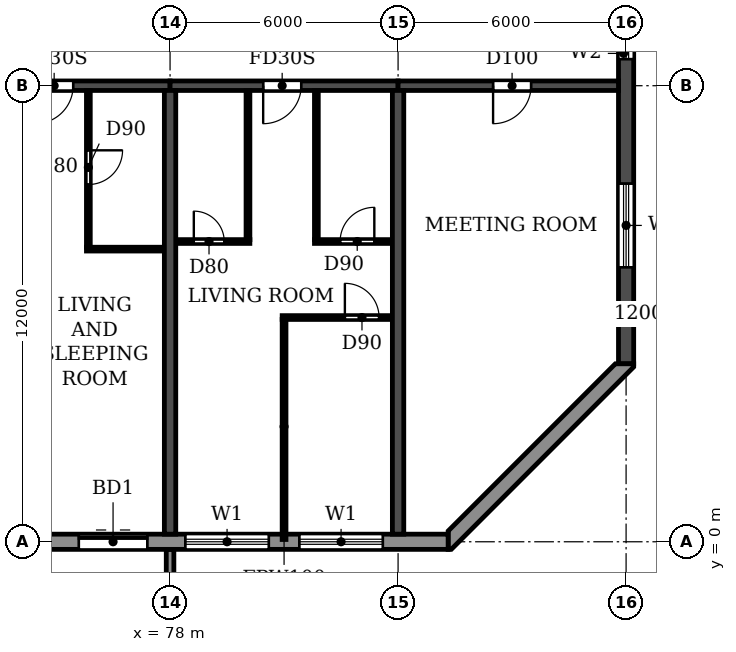
"""IFC4 building model, lengths in metres.
Left out: names, types, materials, properties, quantities, classifications, styles, units other than length and angle.
Written with IfcOpenShell. Run it as: python <this file> out.ifc"""

import sys

from ifc_helpers import new_model, si_unit, direction, frame, frame_2d, origin, place, context, subcontext, project, spatial, polyline, rectangle, outline, extrude, source, transform, mapped, element, fill, save


model = new_model("IFC4")
c1 = context("Model", 3, precision=1e-05, world=origin(), true_north=direction((0.0, 1.0)))
c2 = subcontext(c1, "Body", "Model", "MODEL_VIEW")
j1 = project(units=[si_unit("LENGTHUNIT", "METRE"), si_unit("PLANEANGLEUNIT", "RADIAN")], contexts=[c1])
p1 = place(None, origin())
s1 = spatial("IfcSite", under=j1, at=p1, CompositionType="ELEMENT")
p2 = place(p1, origin())
s2 = spatial("IfcBuilding", under=s1, at=p2, CompositionType="ELEMENT")
p3 = place(p2, frame((0.0, 0.0, 155.4)))
s3 = spatial("IfcBuildingStorey", under=s2, at=p3, CompositionType="ELEMENT", Elevation=155.4)
for number, where, z_axis, x_axis in (
    (1, (78.0, 0.2, 0.0), (0.0, 0.0, 1.0), (0.0, 1.0, 0.0)),
    (2, (84.0, 0.2, 0.0), (0.0, 0.0, 1.0), (0.0, 1.0, 0.0)),
):
    element("IfcWall", number, at=place(p3, frame(where, z_axis=z_axis, x_axis=x_axis)), inside=s3, PredefinedType="SHEAR", context=c2, shape_type="SweptSolid", body=[
        extrude(rectangle(XDim=11.675, YDim=0.3, at=frame_2d((5.837, 0.0))), origin(), (0.0, 0.0, 1.0), 3.0),
    ])
p4 = place(p3, frame((90.0, 4.683, 0.0), z_axis=(0.0, 0.0, 1.0), x_axis=(0.0, 1.0, 0.0)))
e3 = element("IfcWall", 3, at=p4, inside=s3, PredefinedType="SHEAR", context=c2, shape_type="SweptSolid", body=[
    extrude(rectangle(XDim=33.034, YDim=0.4, at=frame_2d((16.517, 0.0))), origin(), (0.0, 0.0, 1.0), 3.0),
])
p5 = place(p4, frame((23.817, 0.0, 0.9)))
e4 = element("IfcOpeningElement", 4, at=p5, cuts=e3, PredefinedType="OPENING", context=c2, shape_type="SweptSolid", body=[
    extrude(rectangle(XDim=1.2, YDim=1.5, at=frame_2d((0.6, 0.75))), frame((0.0, 0.21, 0.0), z_axis=(0.0, -1.0, 0.0), x_axis=(1.0, 0.0, 0.0)), (0.0, 0.0, 1.0), 0.42),
])
p6 = place(p4, frame((8.017, 0.0, 0.9)))
e5 = element("IfcOpeningElement", 5, at=p6, cuts=e3, PredefinedType="OPENING", context=c2, shape_type="SweptSolid", body=[
    extrude(rectangle(XDim=1.2, YDim=1.5, at=frame_2d((0.6, 0.75))), frame((0.0, 0.21, 0.0), z_axis=(0.0, -1.0, 0.0), x_axis=(1.0, 0.0, 0.0)), (0.0, 0.0, 1.0), 0.42),
])
p7 = place(p4, frame((28.293, 0.0, 0.6)))
e6 = element("IfcOpeningElement", 6, at=p7, cuts=e3, PredefinedType="OPENING", context=c2, shape_type="SweptSolid", body=[
    extrude(rectangle(XDim=2.2, YDim=1.8, at=frame_2d((1.1, 0.9))), frame((0.0, 0.21, 0.0), z_axis=(0.0, -1.0, 0.0), x_axis=(1.0, 0.0, 0.0)), (0.0, 0.0, 1.0), 0.42),
])
p8 = place(p4, frame((2.541, 0.0, 0.6)))
e7 = element("IfcOpeningElement", 7, at=p8, cuts=e3, PredefinedType="OPENING", context=c2, shape_type="SweptSolid", body=[
    extrude(rectangle(XDim=2.2, YDim=1.8, at=frame_2d((1.1, 0.9))), frame((0.0, 0.21, 0.0), z_axis=(0.0, -1.0, 0.0), x_axis=(1.0, 0.0, 0.0)), (0.0, 0.0, 1.0), 0.42),
])
p9 = place(p4, frame((19.417, 0.0, 0.6)))
e8 = element("IfcOpeningElement", 8, at=p9, cuts=e3, PredefinedType="OPENING", context=c2, shape_type="SweptSolid", body=[
    extrude(rectangle(XDim=2.2, YDim=1.8, at=frame_2d((1.1, 0.9))), frame((0.0, 0.21, 0.0), z_axis=(0.0, -1.0, 0.0), x_axis=(1.0, 0.0, 0.0)), (0.0, 0.0, 1.0), 0.42),
])
p10 = place(p3, frame((72.0, 12.0, 0.0), z_axis=(0.0, 0.0, 1.0), x_axis=(1.0, 0.0, 0.0)))
e9 = element("IfcWall", 9, at=p10, inside=s3, PredefinedType="SHEAR", context=c2, shape_type="SweptSolid", body=[
    extrude(rectangle(XDim=6.0, YDim=0.25, at=frame_2d((3.0, 0.0))), origin(), (0.0, 0.0, 1.0), 2.4),
])
p11 = place(p10, frame((2.45, 0.0, 0.0)))
e10 = element("IfcOpeningElement", 10, at=p11, cuts=e9, PredefinedType="OPENING", context=c2, shape_type="SweptSolid", body=[
    extrude(rectangle(XDim=1.0, YDim=2.1, at=frame_2d((0.5, 1.05))), frame((0.0, 0.135, 0.0), z_axis=(0.0, -1.0, 0.0), x_axis=(1.0, 0.0, 0.0)), (0.0, 0.0, 1.0), 0.27),
])
p12 = place(p3, frame((78.0, 12.0, 0.0), z_axis=(0.0, 0.0, 1.0), x_axis=(1.0, 0.0, 0.0)))
e11 = element("IfcWall", 11, at=p12, inside=s3, PredefinedType="SHEAR", context=c2, shape_type="SweptSolid", body=[
    extrude(rectangle(XDim=6.0, YDim=0.25, at=frame_2d((3.0, 0.0))), origin(), (0.0, 0.0, 1.0), 2.4),
])
p13 = place(p12, frame((2.45, 0.0, 0.0)))
e12 = element("IfcOpeningElement", 12, at=p13, cuts=e11, PredefinedType="OPENING", context=c2, shape_type="SweptSolid", body=[
    extrude(rectangle(XDim=1.0, YDim=2.1, at=frame_2d((0.5, 1.05))), frame((0.0, 0.135, 0.0), z_axis=(0.0, -1.0, 0.0), x_axis=(1.0, 0.0, 0.0)), (0.0, 0.0, 1.0), 0.27),
])
p14 = place(p3, frame((84.0, 12.0, 0.0), z_axis=(0.0, 0.0, 1.0), x_axis=(1.0, 0.0, 0.0)))
e13 = element("IfcWall", 13, at=p14, inside=s3, PredefinedType="SHEAR", context=c2, shape_type="SweptSolid", body=[
    extrude(rectangle(XDim=5.8, YDim=0.25, at=frame_2d((2.9, 0.0))), origin(), (0.0, 0.0, 1.0), 2.4),
])
p15 = place(p14, frame((2.5, 0.0, 0.0)))
e14 = element("IfcOpeningElement", 14, at=p15, cuts=e13, PredefinedType="OPENING", context=c2, shape_type="SweptSolid", body=[
    extrude(rectangle(XDim=1.0, YDim=2.1, at=frame_2d((0.5, 1.05))), frame((0.0, 0.135, 0.0), z_axis=(0.0, -1.0, 0.0), x_axis=(1.0, 0.0, 0.0)), (0.0, 0.0, 1.0), 0.27),
])
p16 = place(p3, frame((16.683, 0.0, 0.0), z_axis=(0.0, 0.0, 1.0), x_axis=(1.0, 0.0, 0.0)))
e15 = element("IfcWall", 15, at=p16, inside=s3, PredefinedType="STANDARD", context=c2, shape_type="SweptSolid", body=[
    extrude(rectangle(XDim=68.634, YDim=0.4, at=frame_2d((34.317, 0.0))), origin(), (0.0, 0.0, 1.0), 3.0),
])
p17 = place(p16, frame((1.717, 0.0, 0.9)))
e16 = element("IfcOpeningElement", 16, at=p17, cuts=e15, PredefinedType="OPENING", context=c2, shape_type="SweptSolid", body=[
    extrude(rectangle(XDim=2.2, YDim=1.5, at=frame_2d((1.1, 0.75))), frame((0.0, 0.21, 0.0), z_axis=(0.0, -1.0, 0.0), x_axis=(1.0, 0.0, 0.0)), (0.0, 0.0, 1.0), 0.42),
])
p18 = place(p16, frame((4.717, 0.0, 0.9)))
e17 = element("IfcOpeningElement", 17, at=p18, cuts=e15, PredefinedType="OPENING", context=c2, shape_type="SweptSolid", body=[
    extrude(rectangle(XDim=2.2, YDim=1.5, at=frame_2d((1.1, 0.75))), frame((0.0, 0.21, 0.0), z_axis=(0.0, -1.0, 0.0), x_axis=(1.0, 0.0, 0.0)), (0.0, 0.0, 1.0), 0.42),
])
p19 = place(p16, frame((7.917, 0.0, 0.0)))
e18 = element("IfcOpeningElement", 18, at=p19, cuts=e15, PredefinedType="OPENING", context=c2, shape_type="SweptSolid", body=[
    extrude(rectangle(XDim=1.8, YDim=2.4, at=frame_2d((0.9, 1.2))), frame((0.0, 0.21, 0.0), z_axis=(0.0, -1.0, 0.0), x_axis=(1.0, 0.0, 0.0)), (0.0, 0.0, 1.0), 0.42),
])
p20 = place(p16, frame((10.717, 0.0, 0.9)))
e19 = element("IfcOpeningElement", 19, at=p20, cuts=e15, PredefinedType="OPENING", context=c2, shape_type="SweptSolid", body=[
    extrude(rectangle(XDim=2.2, YDim=1.5, at=frame_2d((1.1, 0.75))), frame((0.0, 0.21, 0.0), z_axis=(0.0, -1.0, 0.0), x_axis=(1.0, 0.0, 0.0)), (0.0, 0.0, 1.0), 0.42),
])
p21 = place(p16, frame((13.717, 0.0, 0.9)))
e20 = element("IfcOpeningElement", 20, at=p21, cuts=e15, PredefinedType="OPENING", context=c2, shape_type="SweptSolid", body=[
    extrude(rectangle(XDim=2.2, YDim=1.5, at=frame_2d((1.1, 0.75))), frame((0.0, 0.21, 0.0), z_axis=(0.0, -1.0, 0.0), x_axis=(1.0, 0.0, 0.0)), (0.0, 0.0, 1.0), 0.42),
])
p22 = place(p16, frame((16.717, 0.0, 0.9)))
e21 = element("IfcOpeningElement", 21, at=p22, cuts=e15, PredefinedType="OPENING", context=c2, shape_type="SweptSolid", body=[
    extrude(rectangle(XDim=2.2, YDim=1.5, at=frame_2d((1.1, 0.75))), frame((0.0, 0.21, 0.0), z_axis=(0.0, -1.0, 0.0), x_axis=(1.0, 0.0, 0.0)), (0.0, 0.0, 1.0), 0.42),
])
p23 = place(p16, frame((19.717, 0.0, 0.9)))
e22 = element("IfcOpeningElement", 22, at=p23, cuts=e15, PredefinedType="OPENING", context=c2, shape_type="SweptSolid", body=[
    extrude(rectangle(XDim=2.2, YDim=1.5, at=frame_2d((1.1, 0.75))), frame((0.0, 0.21, 0.0), z_axis=(0.0, -1.0, 0.0), x_axis=(1.0, 0.0, 0.0)), (0.0, 0.0, 1.0), 0.42),
])
p24 = place(p16, frame((22.917, 0.0, 0.0)))
e23 = element("IfcOpeningElement", 23, at=p24, cuts=e15, PredefinedType="OPENING", context=c2, shape_type="SweptSolid", body=[
    extrude(rectangle(XDim=1.8, YDim=2.4, at=frame_2d((0.9, 1.2))), frame((0.0, 0.21, 0.0), z_axis=(0.0, -1.0, 0.0), x_axis=(1.0, 0.0, 0.0)), (0.0, 0.0, 1.0), 0.42),
])
p25 = place(p16, frame((25.717, 0.0, 0.9)))
e24 = element("IfcOpeningElement", 24, at=p25, cuts=e15, PredefinedType="OPENING", context=c2, shape_type="SweptSolid", body=[
    extrude(rectangle(XDim=2.2, YDim=1.5, at=frame_2d((1.1, 0.75))), frame((0.0, 0.21, 0.0), z_axis=(0.0, -1.0, 0.0), x_axis=(1.0, 0.0, 0.0)), (0.0, 0.0, 1.0), 0.42),
])
p26 = place(p16, frame((28.717, 0.0, 0.9)))
e25 = element("IfcOpeningElement", 25, at=p26, cuts=e15, PredefinedType="OPENING", context=c2, shape_type="SweptSolid", body=[
    extrude(rectangle(XDim=2.2, YDim=1.5, at=frame_2d((1.1, 0.75))), frame((0.0, 0.21, 0.0), z_axis=(0.0, -1.0, 0.0), x_axis=(1.0, 0.0, 0.0)), (0.0, 0.0, 1.0), 0.42),
])
p27 = place(p16, frame((31.917, 0.0, 0.0)))
e26 = element("IfcOpeningElement", 26, at=p27, cuts=e15, PredefinedType="OPENING", context=c2, shape_type="SweptSolid", body=[
    extrude(rectangle(XDim=1.8, YDim=2.4, at=frame_2d((0.9, 1.2))), frame((0.0, 0.21, 0.0), z_axis=(0.0, -1.0, 0.0), x_axis=(1.0, 0.0, 0.0)), (0.0, 0.0, 1.0), 0.42),
])
p28 = place(p16, frame((34.717, 0.0, 0.9)))
e27 = element("IfcOpeningElement", 27, at=p28, cuts=e15, PredefinedType="OPENING", context=c2, shape_type="SweptSolid", body=[
    extrude(rectangle(XDim=2.2, YDim=1.5, at=frame_2d((1.1, 0.75))), frame((0.0, 0.21, 0.0), z_axis=(0.0, -1.0, 0.0), x_axis=(1.0, 0.0, 0.0)), (0.0, 0.0, 1.0), 0.42),
])
p29 = place(p16, frame((37.717, 0.0, 0.9)))
e28 = element("IfcOpeningElement", 28, at=p29, cuts=e15, PredefinedType="OPENING", context=c2, shape_type="SweptSolid", body=[
    extrude(rectangle(XDim=2.2, YDim=1.5, at=frame_2d((1.1, 0.75))), frame((0.0, 0.21, 0.0), z_axis=(0.0, -1.0, 0.0), x_axis=(1.0, 0.0, 0.0)), (0.0, 0.0, 1.0), 0.42),
])
p30 = place(p16, frame((40.717, 0.0, 0.9)))
e29 = element("IfcOpeningElement", 29, at=p30, cuts=e15, PredefinedType="OPENING", context=c2, shape_type="SweptSolid", body=[
    extrude(rectangle(XDim=2.2, YDim=1.5, at=frame_2d((1.1, 0.75))), frame((0.0, 0.21, 0.0), z_axis=(0.0, -1.0, 0.0), x_axis=(1.0, 0.0, 0.0)), (0.0, 0.0, 1.0), 0.42),
])
p31 = place(p16, frame((43.717, 0.0, 0.9)))
e30 = element("IfcOpeningElement", 30, at=p31, cuts=e15, PredefinedType="OPENING", context=c2, shape_type="SweptSolid", body=[
    extrude(rectangle(XDim=2.2, YDim=1.5, at=frame_2d((1.1, 0.75))), frame((0.0, 0.21, 0.0), z_axis=(0.0, -1.0, 0.0), x_axis=(1.0, 0.0, 0.0)), (0.0, 0.0, 1.0), 0.42),
])
p32 = place(p16, frame((46.917, 0.0, 0.0)))
e31 = element("IfcOpeningElement", 31, at=p32, cuts=e15, PredefinedType="OPENING", context=c2, shape_type="SweptSolid", body=[
    extrude(rectangle(XDim=1.8, YDim=2.4, at=frame_2d((0.9, 1.2))), frame((0.0, 0.21, 0.0), z_axis=(0.0, -1.0, 0.0), x_axis=(1.0, 0.0, 0.0)), (0.0, 0.0, 1.0), 0.42),
])
p33 = place(p16, frame((49.717, 0.0, 0.9)))
e32 = element("IfcOpeningElement", 32, at=p33, cuts=e15, PredefinedType="OPENING", context=c2, shape_type="SweptSolid", body=[
    extrude(rectangle(XDim=2.2, YDim=1.5, at=frame_2d((1.1, 0.75))), frame((0.0, 0.21, 0.0), z_axis=(0.0, -1.0, 0.0), x_axis=(1.0, 0.0, 0.0)), (0.0, 0.0, 1.0), 0.42),
])
p34 = place(p16, frame((52.717, 0.0, 0.9)))
e33 = element("IfcOpeningElement", 33, at=p34, cuts=e15, PredefinedType="OPENING", context=c2, shape_type="SweptSolid", body=[
    extrude(rectangle(XDim=2.2, YDim=1.5, at=frame_2d((1.1, 0.75))), frame((0.0, 0.21, 0.0), z_axis=(0.0, -1.0, 0.0), x_axis=(1.0, 0.0, 0.0)), (0.0, 0.0, 1.0), 0.42),
])
p35 = place(p16, frame((55.717, 0.0, 0.9)))
e34 = element("IfcOpeningElement", 34, at=p35, cuts=e15, PredefinedType="OPENING", context=c2, shape_type="SweptSolid", body=[
    extrude(rectangle(XDim=2.2, YDim=1.5, at=frame_2d((1.1, 0.75))), frame((0.0, 0.21, 0.0), z_axis=(0.0, -1.0, 0.0), x_axis=(1.0, 0.0, 0.0)), (0.0, 0.0, 1.0), 0.42),
])
p36 = place(p16, frame((58.917, 0.0, 0.0)))
e35 = element("IfcOpeningElement", 35, at=p36, cuts=e15, PredefinedType="OPENING", context=c2, shape_type="SweptSolid", body=[
    extrude(rectangle(XDim=1.8, YDim=2.4, at=frame_2d((0.9, 1.2))), frame((0.0, 0.21, 0.0), z_axis=(0.0, -1.0, 0.0), x_axis=(1.0, 0.0, 0.0)), (0.0, 0.0, 1.0), 0.42),
])
p37 = place(p16, frame((61.717, 0.0, 0.9)))
e36 = element("IfcOpeningElement", 36, at=p37, cuts=e15, PredefinedType="OPENING", context=c2, shape_type="SweptSolid", body=[
    extrude(rectangle(XDim=2.2, YDim=1.5, at=frame_2d((1.1, 0.75))), frame((0.0, 0.21, 0.0), z_axis=(0.0, -1.0, 0.0), x_axis=(1.0, 0.0, 0.0)), (0.0, 0.0, 1.0), 0.42),
])
p38 = place(p16, frame((64.717, 0.0, 0.9)))
e37 = element("IfcOpeningElement", 37, at=p38, cuts=e15, PredefinedType="OPENING", context=c2, shape_type="SweptSolid", body=[
    extrude(rectangle(XDim=2.2, YDim=1.5, at=frame_2d((1.1, 0.75))), frame((0.0, 0.21, 0.0), z_axis=(0.0, -1.0, 0.0), x_axis=(1.0, 0.0, 0.0)), (0.0, 0.0, 1.0), 0.42),
])
p39 = place(p3, origin())
e38 = element("IfcWall", 38, at=p39, inside=s3, PredefinedType="STANDARD", context=c2, shape_type="SweptSolid", body=[
    extrude(outline(polyline([(85.317, -0.2), (85.4, -0.2), (90.2, 4.6), (90.2, 4.683), (89.717, 4.683), (85.317, 0.283), (85.317, -0.2)])), origin(), (0.0, 0.0, 1.0), 3.0),
])
m1 = source(origin(), c2, "Body", "SweptSolid", [
    extrude(outline(polyline([(0.0, 0.0), (0.2, 0.0), (0.2, 1.65), (0.0, 1.65), (0.0, 0.0)])), origin(), (0.0, 0.0, 1.0), 3.1),
])
p40 = place(p3, frame((77.9, -1.85, 0.0)))
e39 = element("IfcWall", 39, at=p40, inside=s3, PredefinedType="STANDARD", context=c2, shape_type="MappedRepresentation", body=[
    mapped(m1, transform((0.0, 0.0, 0.0))),
])
p41 = place(p3, frame((80.95, 5.9, 0.0), z_axis=(0.0, 0.0, 1.0), x_axis=(1.0, 0.0, 0.0)))
e40 = element("IfcWall", 40, at=p41, inside=s3, PredefinedType="PARTITIONING", context=c2, shape_type="SweptSolid", body=[
    extrude(rectangle(XDim=2.89, YDim=0.1, at=frame_2d((1.445, 0.0))), origin(), (0.0, 0.0, 1.0), 3.0),
])
p42 = place(p41, frame((1.65, 0.0, 0.0)))
e41 = element("IfcOpeningElement", 41, at=p42, cuts=e40, PredefinedType="OPENING", context=c2, shape_type="SweptSolid", body=[
    extrude(rectangle(XDim=0.9, YDim=2.1, at=frame_2d((0.45, 1.05))), frame((0.0, 0.06, 0.0), z_axis=(0.0, -1.0, 0.0), x_axis=(1.0, 0.0, 0.0)), (0.0, 0.0, 1.0), 0.12),
])
p43 = place(p3, frame((75.8, 7.7, 0.0), z_axis=(0.0, 0.0, 1.0), x_axis=(1.0, 0.0, 0.0)))
e42 = element("IfcWall", 42, at=p43, inside=s3, PredefinedType="PARTITIONING", context=c2, shape_type="SweptSolid", body=[
    extrude(rectangle(XDim=2.04, YDim=0.1, at=frame_2d((1.02, 0.0))), origin(), (0.0, 0.0, 1.0), 3.0),
])
p44 = place(p3, frame((78.16, 7.9, 0.0), z_axis=(0.0, 0.0, 1.0), x_axis=(1.0, 0.0, 0.0)))
e43 = element("IfcWall", 43, at=p44, inside=s3, PredefinedType="PARTITIONING", context=c2, shape_type="SweptSolid", body=[
    extrude(rectangle(XDim=1.94, YDim=0.1, at=frame_2d((0.97, 0.0))), origin(), (0.0, 0.0, 1.0), 3.0),
])
p45 = place(p44, frame((0.465, 0.0, 0.0)))
e44 = element("IfcOpeningElement", 44, at=p45, cuts=e43, PredefinedType="OPENING", context=c2, shape_type="SweptSolid", body=[
    extrude(rectangle(XDim=0.8, YDim=2.1, at=frame_2d((0.4, 1.05))), frame((0.0, 0.06, 0.0), z_axis=(0.0, -1.0, 0.0), x_axis=(1.0, 0.0, 0.0)), (0.0, 0.0, 1.0), 0.12),
])
p46 = place(p3, frame((81.8, 7.9, 0.0), z_axis=(0.0, 0.0, 1.0), x_axis=(1.0, 0.0, 0.0)))
e45 = element("IfcWall", 45, at=p46, inside=s3, PredefinedType="PARTITIONING", context=c2, shape_type="SweptSolid", body=[
    extrude(rectangle(XDim=2.04, YDim=0.1, at=frame_2d((1.02, 0.0))), origin(), (0.0, 0.0, 1.0), 3.0),
])
p47 = place(p46, frame((0.675, 0.0, 0.0)))
e46 = element("IfcOpeningElement", 46, at=p47, cuts=e45, PredefinedType="OPENING", context=c2, shape_type="SweptSolid", body=[
    extrude(rectangle(XDim=0.9, YDim=2.1, at=frame_2d((0.45, 1.05))), frame((0.0, 0.06, 0.0), z_axis=(0.0, -1.0, 0.0), x_axis=(1.0, 0.0, 0.0)), (0.0, 0.0, 1.0), 0.12),
])
p48 = place(p3, frame((75.85, 7.75, 0.0), z_axis=(0.0, 0.0, 1.0), x_axis=(0.0, 1.0, 0.0)))
e47 = element("IfcWall", 47, at=p48, inside=s3, PredefinedType="PARTITIONING", context=c2, shape_type="SweptSolid", body=[
    extrude(rectangle(XDim=4.115, YDim=0.1, at=frame_2d((2.058, 0.0))), origin(), (0.0, 0.0, 1.0), 3.0),
])
p49 = place(p48, frame((1.65, 0.0, 0.0)))
e48 = element("IfcOpeningElement", 48, at=p49, cuts=e47, PredefinedType="OPENING", context=c2, shape_type="SweptSolid", body=[
    extrude(rectangle(XDim=0.9, YDim=2.1, at=frame_2d((0.45, 1.05))), frame((0.0, 0.06, 0.0), z_axis=(0.0, -1.0, 0.0), x_axis=(1.0, 0.0, 0.0)), (0.0, 0.0, 1.0), 0.12),
])
p50 = place(p3, frame((80.05, 7.95, 0.0), z_axis=(0.0, 0.0, 1.0), x_axis=(0.0, 1.0, 0.0)))
e49 = element("IfcWall", 49, at=p50, inside=s3, PredefinedType="PARTITIONING", context=c2, shape_type="SweptSolid", body=[
    extrude(rectangle(XDim=3.915, YDim=0.1, at=frame_2d((1.958, 0.0))), origin(), (0.0, 0.0, 1.0), 3.0),
])
p51 = place(p3, frame((81.0, 0.06, 0.0), z_axis=(0.0, 0.0, 1.0), x_axis=(0.0, 1.0, 0.0)))
e50 = element("IfcWall", 50, at=p51, inside=s3, PredefinedType="PARTITIONING", context=c2, shape_type="SweptSolid", body=[
    extrude(rectangle(XDim=5.79, YDim=0.1, at=frame_2d((2.895, 0.0))), origin(), (0.0, 0.0, 1.0), 3.0),
])
p52 = place(p3, frame((81.85, 7.95, 0.0), z_axis=(0.0, 0.0, 1.0), x_axis=(0.0, 1.0, 0.0)))
e51 = element("IfcWall", 51, at=p52, inside=s3, PredefinedType="PARTITIONING", context=c2, shape_type="SweptSolid", body=[
    extrude(rectangle(XDim=3.915, YDim=0.1, at=frame_2d((1.958, 0.0))), origin(), (0.0, 0.0, 1.0), 3.0),
])
p53 = place(p36, origin())
e52 = element("IfcDoor", 52, at=p53, inside=s3, OperationType="DOUBLE_DOOR_SLIDING", PredefinedType="DOOR", context=c2, shape_type="SweptSolid", body=[
    extrude(rectangle(XDim=1.8, YDim=2.4, at=frame_2d((0.9, 1.2))), frame((0.0, 0.025, 0.0), z_axis=(0.0, -1.0, 0.0), x_axis=(1.0, 0.0, 0.0)), (0.0, 0.0, 1.0), 0.05),
])
fill(e35, e52)
p54 = place(p37, origin())
e53 = element("IfcWindow", 53, at=p54, inside=s3, PartitioningType="DOUBLE_PANEL_HORIZONTAL", PredefinedType="WINDOW", context=c2, shape_type="SweptSolid", body=[
    extrude(rectangle(XDim=2.2, YDim=1.5, at=frame_2d((1.1, 0.75))), frame((0.0, 0.03, 0.0), z_axis=(0.0, -1.0, 0.0), x_axis=(1.0, 0.0, 0.0)), (0.0, 0.0, 1.0), 0.06),
])
fill(e36, e53)
p55 = place(p38, origin())
e54 = element("IfcWindow", 54, at=p55, inside=s3, PartitioningType="DOUBLE_PANEL_HORIZONTAL", PredefinedType="WINDOW", context=c2, shape_type="SweptSolid", body=[
    extrude(rectangle(XDim=2.2, YDim=1.5, at=frame_2d((1.1, 0.75))), frame((0.0, 0.03, 0.0), z_axis=(0.0, -1.0, 0.0), x_axis=(1.0, 0.0, 0.0)), (0.0, 0.0, 1.0), 0.06),
])
fill(e37, e54)
p56 = place(p6, origin())
e55 = element("IfcWindow", 55, at=p56, inside=s3, PartitioningType="SINGLE_PANEL", PredefinedType="WINDOW", context=c2, shape_type="SweptSolid", body=[
    extrude(rectangle(XDim=1.2, YDim=1.5, at=frame_2d((0.6, 0.75))), frame((0.0, 0.03, 0.0), z_axis=(0.0, -1.0, 0.0), x_axis=(1.0, 0.0, 0.0)), (0.0, 0.0, 1.0), 0.06),
])
fill(e5, e55)
p57 = place(p8, origin())
e56 = element("IfcWindow", 56, at=p57, inside=s3, PartitioningType="DOUBLE_PANEL_HORIZONTAL", PredefinedType="WINDOW", context=c2, shape_type="SweptSolid", body=[
    extrude(rectangle(XDim=2.2, YDim=1.8, at=frame_2d((1.1, 0.9))), frame((0.0, 0.03, 0.0), z_axis=(0.0, -1.0, 0.0), x_axis=(1.0, 0.0, 0.0)), (0.0, 0.0, 1.0), 0.06),
])
fill(e7, e56)
p58 = place(p11, frame((1.0, 0.0, 0.0), z_axis=(0.0, 0.0, 1.0), x_axis=(-1.0, 0.0, 0.0)))
e57 = element("IfcDoor", 57, at=p58, inside=s3, OperationType="SINGLE_SWING_RIGHT", PredefinedType="DOOR", context=c2, shape_type="SweptSolid", body=[
    extrude(rectangle(XDim=1.0, YDim=2.1, at=frame_2d((0.5, 1.05))), frame((0.0, 0.025, 0.0), z_axis=(0.0, -1.0, 0.0), x_axis=(1.0, 0.0, 0.0)), (0.0, 0.0, 1.0), 0.05),
])
fill(e10, e57)
p59 = place(p49, frame((0.9, 0.0, 0.0), z_axis=(0.0, 0.0, 1.0), x_axis=(-1.0, 0.0, 0.0)))
e58 = element("IfcDoor", 58, at=p59, inside=s3, OperationType="SINGLE_SWING_LEFT", PredefinedType="DOOR", context=c2, shape_type="SweptSolid", body=[
    extrude(rectangle(XDim=0.9, YDim=2.1, at=frame_2d((0.45, 1.05))), frame((0.0, 0.025, 0.0), z_axis=(0.0, -1.0, 0.0), x_axis=(1.0, 0.0, 0.0)), (0.0, 0.0, 1.0), 0.05),
])
fill(e48, e58)
p60 = place(p45, origin())
e59 = element("IfcDoor", 59, at=p60, inside=s3, OperationType="SINGLE_SWING_LEFT", PredefinedType="DOOR", context=c2, shape_type="SweptSolid", body=[
    extrude(rectangle(XDim=0.8, YDim=2.1, at=frame_2d((0.4, 1.05))), frame((0.0, 0.025, 0.0), z_axis=(0.0, -1.0, 0.0), x_axis=(1.0, 0.0, 0.0)), (0.0, 0.0, 1.0), 0.05),
])
fill(e44, e59)
p61 = place(p13, frame((1.0, 0.0, 0.0), z_axis=(0.0, 0.0, 1.0), x_axis=(-1.0, 0.0, 0.0)))
e60 = element("IfcDoor", 60, at=p61, inside=s3, OperationType="SINGLE_SWING_RIGHT", PredefinedType="DOOR", context=c2, shape_type="SweptSolid", body=[
    extrude(rectangle(XDim=1.0, YDim=2.1, at=frame_2d((0.5, 1.05))), frame((0.0, 0.025, 0.0), z_axis=(0.0, -1.0, 0.0), x_axis=(1.0, 0.0, 0.0)), (0.0, 0.0, 1.0), 0.05),
])
fill(e12, e60)
p62 = place(p47, origin())
e61 = element("IfcDoor", 61, at=p62, inside=s3, OperationType="SINGLE_SWING_RIGHT", PredefinedType="DOOR", context=c2, shape_type="SweptSolid", body=[
    extrude(rectangle(XDim=0.9, YDim=2.1, at=frame_2d((0.45, 1.05))), frame((0.0, 0.025, 0.0), z_axis=(0.0, -1.0, 0.0), x_axis=(1.0, 0.0, 0.0)), (0.0, 0.0, 1.0), 0.05),
])
fill(e46, e61)
p63 = place(p42, origin())
e62 = element("IfcDoor", 62, at=p63, inside=s3, OperationType="SINGLE_SWING_LEFT", PredefinedType="DOOR", context=c2, shape_type="SweptSolid", body=[
    extrude(rectangle(XDim=0.9, YDim=2.1, at=frame_2d((0.45, 1.05))), frame((0.0, 0.025, 0.0), z_axis=(0.0, -1.0, 0.0), x_axis=(1.0, 0.0, 0.0)), (0.0, 0.0, 1.0), 0.05),
])
fill(e41, e62)
p64 = place(p15, frame((1.0, 0.0, 0.0), z_axis=(0.0, 0.0, 1.0), x_axis=(-1.0, 0.0, 0.0)))
e63 = element("IfcDoor", 63, at=p64, inside=s3, OperationType="SINGLE_SWING_RIGHT", PredefinedType="DOOR", context=c2, shape_type="SweptSolid", body=[
    extrude(rectangle(XDim=1.0, YDim=2.1, at=frame_2d((0.5, 1.05))), frame((0.0, 0.025, 0.0), z_axis=(0.0, -1.0, 0.0), x_axis=(1.0, 0.0, 0.0)), (0.0, 0.0, 1.0), 0.05),
])
fill(e14, e63)
save(model, sys.argv[1])
